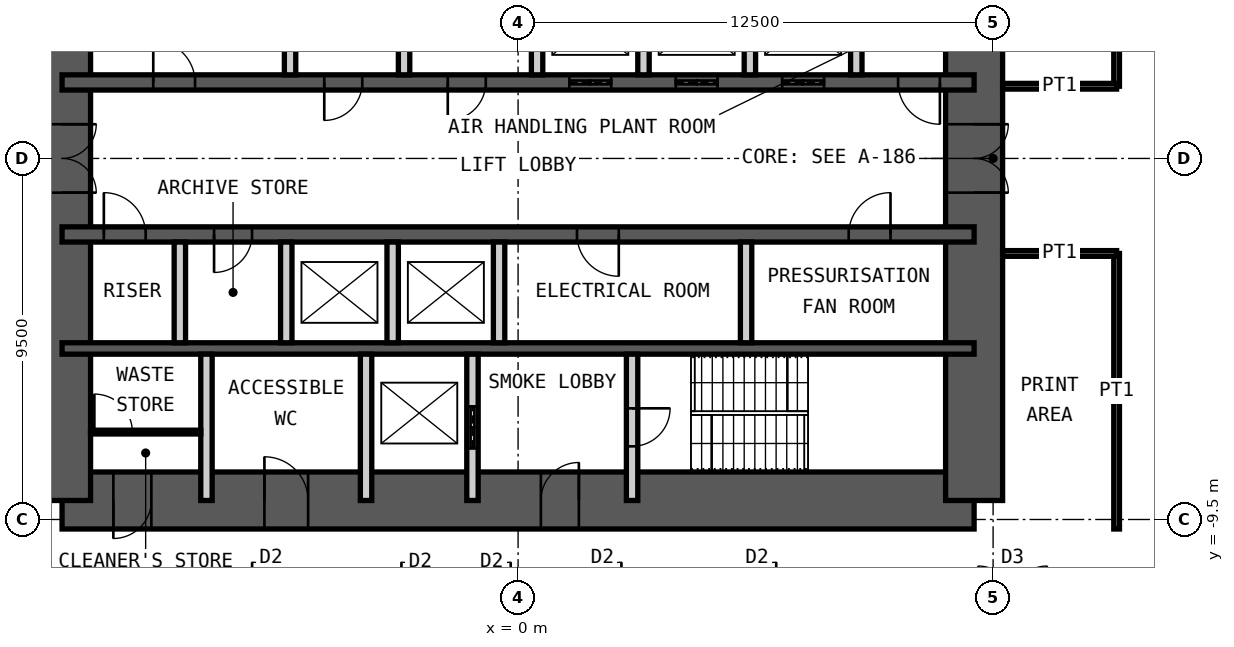
"""IFC4 building model, lengths in metres.
Left out: names, types, materials, properties, quantities, classifications, styles, units other than length and angle.
Written with IfcOpenShell. Run it as: python <this file> out.ifc"""

import sys

from ifc_helpers import new_model, si_unit, direction, frame, frame_2d, origin, place, context, subcontext, project, spatial, rectangle, extrude, element, fill, save


model = new_model("IFC4")
c1 = context("Model", 3, precision=1e-05, world=origin(), true_north=direction((0.0, 1.0)))
c2 = subcontext(c1, "Body", "Model", "MODEL_VIEW")
j1 = project(units=[si_unit("LENGTHUNIT", "METRE"), si_unit("PLANEANGLEUNIT", "RADIAN")], contexts=[c1])
p1 = place(None, origin())
s1 = spatial("IfcSite", under=j1, at=p1, CompositionType="ELEMENT")
p2 = place(p1, origin())
s2 = spatial("IfcBuilding", under=s1, at=p2, CompositionType="ELEMENT")
p3 = place(p2, frame((0.0, 0.0, 111.4)))
s3 = spatial("IfcBuildingStorey", under=s2, at=p3, CompositionType="ELEMENT", Elevation=111.4)
p4 = place(p3, frame((-12.0, -9.0, 0.0), z_axis=(0.0, 0.0, 1.0), x_axis=(1.0, 0.0, 0.0)))
e1 = element("IfcWall", 1, at=p4, inside=s3, PredefinedType="SHEAR", context=c2, shape_type="SweptSolid", body=[
    extrude(rectangle(XDim=24.0, YDim=1.5, at=frame_2d((12.0, 0.0))), origin(), (0.0, 0.0, 1.0), 4.2),
])
p5 = place(p4, frame((1.35, 0.0, 0.0)))
e2 = element("IfcOpeningElement", 2, at=p5, cuts=e1, PredefinedType="OPENING", context=c2, shape_type="SweptSolid", body=[
    extrude(rectangle(XDim=1.0, YDim=2.1, at=frame_2d((0.5, 1.05))), frame((0.0, 0.76, 0.0), z_axis=(0.0, -1.0, 0.0), x_axis=(1.0, 0.0, 0.0)), (0.0, 0.0, 1.0), 1.52),
])
p6 = place(p4, frame((5.325, 0.0, 0.0)))
e3 = element("IfcOpeningElement", 3, at=p6, cuts=e1, PredefinedType="OPENING", context=c2, shape_type="SweptSolid", body=[
    extrude(rectangle(XDim=1.15, YDim=2.1, at=frame_2d((0.575, 1.05))), frame((0.0, 0.76, 0.0), z_axis=(0.0, -1.0, 0.0), x_axis=(1.0, 0.0, 0.0)), (0.0, 0.0, 1.0), 1.52),
])
p7 = place(p4, frame((12.6, 0.0, 0.0)))
e4 = element("IfcOpeningElement", 4, at=p7, cuts=e1, PredefinedType="OPENING", context=c2, shape_type="SweptSolid", body=[
    extrude(rectangle(XDim=1.0, YDim=2.1, at=frame_2d((0.5, 1.05))), frame((0.0, 0.76, 0.0), z_axis=(0.0, -1.0, 0.0), x_axis=(1.0, 0.0, 0.0)), (0.0, 0.0, 1.0), 1.52),
])
p8 = place(p3, frame((12.0, -9.0, 0.0), z_axis=(0.0, 0.0, 1.0), x_axis=(0.0, 1.0, 0.0)))
e5 = element("IfcWall", 5, at=p8, inside=s3, PredefinedType="SHEAR", context=c2, shape_type="SweptSolid", body=[
    extrude(rectangle(XDim=18.0, YDim=1.5, at=frame_2d((9.0, 0.0))), origin(), (0.0, 0.0, 1.0), 4.2),
])
p9 = place(p8, frame((8.1, 0.0, 0.0)))
e6 = element("IfcOpeningElement", 6, at=p9, cuts=e5, PredefinedType="OPENING", context=c2, shape_type="SweptSolid", body=[
    extrude(rectangle(XDim=1.8, YDim=2.1, at=frame_2d((0.9, 1.05))), frame((0.0, 0.76, 0.0), z_axis=(0.0, -1.0, 0.0), x_axis=(1.0, 0.0, 0.0)), (0.0, 0.0, 1.0), 1.52),
])
p10 = place(p3, frame((-12.0, -9.0, 0.0), z_axis=(0.0, 0.0, 1.0), x_axis=(0.0, 1.0, 0.0)))
e7 = element("IfcWall", 7, at=p10, inside=s3, PredefinedType="SHEAR", context=c2, shape_type="SweptSolid", body=[
    extrude(rectangle(XDim=18.0, YDim=1.5, at=frame_2d((9.0, 0.0))), origin(), (0.0, 0.0, 1.0), 4.2),
])
p11 = place(p10, frame((8.1, 0.0, 0.0)))
e8 = element("IfcOpeningElement", 8, at=p11, cuts=e7, PredefinedType="OPENING", context=c2, shape_type="SweptSolid", body=[
    extrude(rectangle(XDim=1.8, YDim=2.1, at=frame_2d((0.9, 1.05))), frame((0.0, 0.76, 0.0), z_axis=(0.0, -1.0, 0.0), x_axis=(1.0, 0.0, 0.0)), (0.0, 0.0, 1.0), 1.52),
])
p12 = place(p3, frame((-12.0, 2.0, 0.0), z_axis=(0.0, 0.0, 1.0), x_axis=(1.0, 0.0, 0.0)))
e9 = element("IfcWall", 9, at=p12, inside=s3, PredefinedType="SHEAR", context=c2, shape_type="SweptSolid", body=[
    extrude(rectangle(XDim=24.0, YDim=0.4, at=frame_2d((12.0, 0.0))), origin(), (0.0, 0.0, 1.0), 4.2),
])
p13 = place(p12, frame((2.4, 0.0, 0.0)))
e10 = element("IfcOpeningElement", 10, at=p13, cuts=e9, PredefinedType="OPENING", context=c2, shape_type="SweptSolid", body=[
    extrude(rectangle(XDim=1.1, YDim=2.1, at=frame_2d((0.55, 1.05))), frame((0.0, 0.21, 0.0), z_axis=(0.0, -1.0, 0.0), x_axis=(1.0, 0.0, 0.0)), (0.0, 0.0, 1.0), 0.42),
])
p14 = place(p12, frame((22.0, 0.0, 0.0)))
e11 = element("IfcOpeningElement", 11, at=p14, cuts=e9, PredefinedType="OPENING", context=c2, shape_type="SweptSolid", body=[
    extrude(rectangle(XDim=1.1, YDim=2.1, at=frame_2d((0.55, 1.05))), frame((0.0, 0.21, 0.0), z_axis=(0.0, -1.0, 0.0), x_axis=(1.0, 0.0, 0.0)), (0.0, 0.0, 1.0), 0.42),
])
p15 = place(p12, frame((10.15, 0.0, 0.0)))
e12 = element("IfcOpeningElement", 12, at=p15, cuts=e9, PredefinedType="OPENING", context=c2, shape_type="SweptSolid", body=[
    extrude(rectangle(XDim=1.0, YDim=2.1, at=frame_2d((0.5, 1.05))), frame((0.0, 0.21, 0.0), z_axis=(0.0, -1.0, 0.0), x_axis=(1.0, 0.0, 0.0)), (0.0, 0.0, 1.0), 0.42),
])
p16 = place(p12, frame((6.9, 0.0, 0.0)))
e13 = element("IfcOpeningElement", 13, at=p16, cuts=e9, PredefinedType="OPENING", context=c2, shape_type="SweptSolid", body=[
    extrude(rectangle(XDim=1.0, YDim=2.1, at=frame_2d((0.5, 1.05))), frame((0.0, 0.21, 0.0), z_axis=(0.0, -1.0, 0.0), x_axis=(1.0, 0.0, 0.0)), (0.0, 0.0, 1.0), 0.42),
])
p17 = place(p12, frame((13.35, 0.0, 0.0)))
e14 = element("IfcOpeningElement", 14, at=p17, cuts=e9, PredefinedType="OPENING", context=c2, shape_type="SweptSolid", body=[
    extrude(rectangle(XDim=1.1, YDim=2.4, at=frame_2d((0.55, 1.2))), frame((0.0, 0.21, 0.0), z_axis=(0.0, -1.0, 0.0), x_axis=(1.0, 0.0, 0.0)), (0.0, 0.0, 1.0), 0.42),
])
p18 = place(p12, frame((16.15, 0.0, 0.0)))
e15 = element("IfcOpeningElement", 15, at=p18, cuts=e9, PredefinedType="OPENING", context=c2, shape_type="SweptSolid", body=[
    extrude(rectangle(XDim=1.1, YDim=2.4, at=frame_2d((0.55, 1.2))), frame((0.0, 0.21, 0.0), z_axis=(0.0, -1.0, 0.0), x_axis=(1.0, 0.0, 0.0)), (0.0, 0.0, 1.0), 0.42),
])
p19 = place(p12, frame((18.95, 0.0, 0.0)))
e16 = element("IfcOpeningElement", 16, at=p19, cuts=e9, PredefinedType="OPENING", context=c2, shape_type="SweptSolid", body=[
    extrude(rectangle(XDim=1.1, YDim=2.4, at=frame_2d((0.55, 1.2))), frame((0.0, 0.21, 0.0), z_axis=(0.0, -1.0, 0.0), x_axis=(1.0, 0.0, 0.0)), (0.0, 0.0, 1.0), 0.42),
])
p20 = place(p3, frame((-12.0, -2.0, 0.0), z_axis=(0.0, 0.0, 1.0), x_axis=(1.0, 0.0, 0.0)))
e17 = element("IfcWall", 17, at=p20, inside=s3, PredefinedType="SHEAR", context=c2, shape_type="SweptSolid", body=[
    extrude(rectangle(XDim=24.0, YDim=0.4, at=frame_2d((12.0, 0.0))), origin(), (0.0, 0.0, 1.0), 4.2),
])
p21 = place(p20, frame((1.1, 0.0, 0.0)))
e18 = element("IfcOpeningElement", 18, at=p21, cuts=e17, PredefinedType="OPENING", context=c2, shape_type="SweptSolid", body=[
    extrude(rectangle(XDim=1.1, YDim=2.1, at=frame_2d((0.55, 1.05))), frame((0.0, 0.21, 0.0), z_axis=(0.0, -1.0, 0.0), x_axis=(1.0, 0.0, 0.0)), (0.0, 0.0, 1.0), 0.42),
])
p22 = place(p20, frame((13.55, 0.0, 0.0)))
e19 = element("IfcOpeningElement", 19, at=p22, cuts=e17, PredefinedType="OPENING", context=c2, shape_type="SweptSolid", body=[
    extrude(rectangle(XDim=1.1, YDim=2.1, at=frame_2d((0.55, 1.05))), frame((0.0, 0.21, 0.0), z_axis=(0.0, -1.0, 0.0), x_axis=(1.0, 0.0, 0.0)), (0.0, 0.0, 1.0), 0.42),
])
p23 = place(p20, frame((20.7, 0.0, 0.0)))
e20 = element("IfcOpeningElement", 20, at=p23, cuts=e17, PredefinedType="OPENING", context=c2, shape_type="SweptSolid", body=[
    extrude(rectangle(XDim=1.1, YDim=2.1, at=frame_2d((0.55, 1.05))), frame((0.0, 0.21, 0.0), z_axis=(0.0, -1.0, 0.0), x_axis=(1.0, 0.0, 0.0)), (0.0, 0.0, 1.0), 0.42),
])
p24 = place(p20, frame((4.0, 0.0, 0.0)))
e21 = element("IfcOpeningElement", 21, at=p24, cuts=e17, PredefinedType="OPENING", context=c2, shape_type="SweptSolid", body=[
    extrude(rectangle(XDim=1.0, YDim=2.1, at=frame_2d((0.5, 1.05))), frame((0.0, 0.21, 0.0), z_axis=(0.0, -1.0, 0.0), x_axis=(1.0, 0.0, 0.0)), (0.0, 0.0, 1.0), 0.42),
])
p25 = place(p3, frame((-12.0, -5.0, 0.0), z_axis=(0.0, 0.0, 1.0), x_axis=(1.0, 0.0, 0.0)))
e22 = element("IfcWall", 22, at=p25, inside=s3, PredefinedType="SHEAR", context=c2, shape_type="SweptSolid", body=[
    extrude(rectangle(XDim=24.0, YDim=0.3, at=frame_2d((12.0, 0.0))), origin(), (0.0, 0.0, 1.0), 4.2),
])
for number, where, z_axis, x_axis in (
    (23, (-6.0, 2.2, 0.0), (0.0, 0.0, 1.0), (0.0, 1.0, 0.0)),
    (24, (-3.0, 2.2, 0.0), (0.0, 0.0, 1.0), (0.0, 1.0, 0.0)),
    (25, (0.5, 2.2, 0.0), (0.0, 0.0, 1.0), (0.0, 1.0, 0.0)),
    (26, (3.3, 2.2, 0.0), (0.0, 0.0, 1.0), (0.0, 1.0, 0.0)),
    (27, (6.1, 2.2, 0.0), (0.0, 0.0, 1.0), (0.0, 1.0, 0.0)),
    (28, (8.9, 2.2, 0.0), (0.0, 0.0, 1.0), (0.0, 1.0, 0.0)),
    (29, (-8.9, -4.85, 0.0), (0.0, 0.0, 1.0), (0.0, 1.0, 0.0)),
    (30, (-6.1, -4.85, 0.0), (0.0, 0.0, 1.0), (0.0, 1.0, 0.0)),
    (31, (-3.3, -4.85, 0.0), (0.0, 0.0, 1.0), (0.0, 1.0, 0.0)),
    (32, (-0.5, -4.85, 0.0), (0.0, 0.0, 1.0), (0.0, 1.0, 0.0)),
    (33, (6.0, -4.85, 0.0), (0.0, 0.0, 1.0), (0.0, 1.0, 0.0)),
):
    element("IfcWall", number, at=place(p3, frame(where, z_axis=z_axis, x_axis=x_axis)), inside=s3, PredefinedType="PARTITIONING", context=c2, shape_type="SweptSolid", body=[
        extrude(rectangle(XDim=2.65, YDim=0.3, at=frame_2d((1.325, 0.0))), origin(), (0.0, 0.0, 1.0), 3.98),
    ])
for number, where, z_axis, x_axis in (
    (34, (-8.2, -9.0, 0.0), (0.0, 0.0, 1.0), (0.0, 1.0, 0.0)),
    (35, (-4.0, -9.0, 0.0), (0.0, 0.0, 1.0), (0.0, 1.0, 0.0)),
):
    element("IfcWall", number, at=place(p3, frame(where, z_axis=z_axis, x_axis=x_axis)), inside=s3, PredefinedType="PARTITIONING", context=c2, shape_type="SweptSolid", body=[
        extrude(rectangle(XDim=3.85, YDim=0.3, at=frame_2d((1.925, 0.0))), origin(), (0.0, 0.0, 1.0), 3.98),
    ])
p26 = place(p3, frame((-1.2, -9.0, 0.0), z_axis=(0.0, 0.0, 1.0), x_axis=(0.0, 1.0, 0.0)))
e36 = element("IfcWall", 36, at=p26, inside=s3, PredefinedType="PARTITIONING", context=c2, shape_type="SweptSolid", body=[
    extrude(rectangle(XDim=3.85, YDim=0.3, at=frame_2d((1.925, 0.0))), origin(), (0.0, 0.0, 1.0), 3.98),
])
p27 = place(p26, frame((1.375, 0.0, 0.0)))
e37 = element("IfcOpeningElement", 37, at=p27, cuts=e36, PredefinedType="OPENING", context=c2, shape_type="SweptSolid", body=[
    extrude(rectangle(XDim=1.1, YDim=2.4, at=frame_2d((0.55, 1.2))), frame((0.0, 0.16, 0.0), z_axis=(0.0, -1.0, 0.0), x_axis=(1.0, 0.0, 0.0)), (0.0, 0.0, 1.0), 0.32),
])
p28 = place(p3, frame((3.0, -9.0, 0.0), z_axis=(0.0, 0.0, 1.0), x_axis=(0.0, 1.0, 0.0)))
e38 = element("IfcWall", 38, at=p28, inside=s3, PredefinedType="PARTITIONING", context=c2, shape_type="SweptSolid", body=[
    extrude(rectangle(XDim=3.85, YDim=0.3, at=frame_2d((1.925, 0.0))), origin(), (0.0, 0.0, 1.0), 3.98),
])
p29 = place(p28, frame((1.425, 0.0, 0.0)))
e39 = element("IfcOpeningElement", 39, at=p29, cuts=e38, PredefinedType="OPENING", context=c2, shape_type="SweptSolid", body=[
    extrude(rectangle(XDim=1.0, YDim=2.1, at=frame_2d((0.5, 1.05))), frame((0.0, 0.16, 0.0), z_axis=(0.0, -1.0, 0.0), x_axis=(1.0, 0.0, 0.0)), (0.0, 0.0, 1.0), 0.32),
])
p30 = place(p3, frame((-11.25, -7.2, 0.0), z_axis=(0.0, 0.0, 1.0), x_axis=(1.0, 0.0, 0.0)))
e40 = element("IfcWall", 40, at=p30, inside=s3, PredefinedType="PARTITIONING", context=c2, shape_type="SweptSolid", body=[
    extrude(rectangle(XDim=2.9, YDim=0.1, at=frame_2d((1.45, 0.0))), origin(), (0.0, 0.0, 1.0), 3.98),
])
p31 = place(p30, frame((0.1, 0.0, 0.0)))
e41 = element("IfcOpeningElement", 41, at=p31, cuts=e40, PredefinedType="OPENING", context=c2, shape_type="SweptSolid", body=[
    extrude(rectangle(XDim=1.0, YDim=2.4, at=frame_2d((0.5, 1.2))), frame((0.0, 0.06, 0.0), z_axis=(0.0, -1.0, 0.0), x_axis=(1.0, 0.0, 0.0)), (0.0, 0.0, 1.0), 0.12),
])
p32 = place(p3, frame((15.75, 1.9, 0.0), z_axis=(0.0, 0.0, 1.0), x_axis=(0.0, 1.0, 0.0)))
e42 = element("IfcWall", 42, at=p32, inside=s3, PredefinedType="PARTITIONING", context=c2, shape_type="SweptSolid", body=[
    extrude(rectangle(XDim=7.85, YDim=0.15, at=frame_2d((3.925, 0.0))), origin(), (0.0, 0.0, 1.0), 4.03),
])
p33 = place(p3, frame((12.75, 1.9, 0.0), z_axis=(0.0, 0.0, 1.0), x_axis=(1.0, 0.0, 0.0)))
e43 = element("IfcWall", 43, at=p33, inside=s3, PredefinedType="PARTITIONING", context=c2, shape_type="SweptSolid", body=[
    extrude(rectangle(XDim=3.0, YDim=0.15, at=frame_2d((1.5, 0.0))), origin(), (0.0, 0.0, 1.0), 2.93),
])
p34 = place(p3, frame((15.75, -9.75, 0.0), z_axis=(0.0, 0.0, 1.0), x_axis=(0.0, 1.0, 0.0)))
e44 = element("IfcWall", 44, at=p34, inside=s3, PredefinedType="PARTITIONING", context=c2, shape_type="SweptSolid", body=[
    extrude(rectangle(XDim=7.25, YDim=0.15, at=frame_2d((3.625, 0.0))), origin(), (0.0, 0.0, 1.0), 4.03),
])
p35 = place(p3, frame((12.75, -2.5, 0.0), z_axis=(0.0, 0.0, 1.0), x_axis=(1.0, 0.0, 0.0)))
e45 = element("IfcWall", 45, at=p35, inside=s3, PredefinedType="PARTITIONING", context=c2, shape_type="SweptSolid", body=[
    extrude(rectangle(XDim=3.0, YDim=0.15, at=frame_2d((1.5, 0.0))), origin(), (0.0, 0.0, 1.0), 3.33),
])
p36 = place(p5, origin())
e46 = element("IfcDoor", 46, at=p36, inside=s3, OperationType="SINGLE_SWING_LEFT", PredefinedType="DOOR", context=c2, shape_type="SweptSolid", body=[
    extrude(rectangle(XDim=1.0, YDim=2.1, at=frame_2d((0.5, 1.05))), frame((0.0, 0.025, 0.0), z_axis=(0.0, -1.0, 0.0), x_axis=(1.0, 0.0, 0.0)), (0.0, 0.0, 1.0), 0.05),
])
fill(e2, e46)
p37 = place(p6, origin())
e47 = element("IfcDoor", 47, at=p37, inside=s3, OperationType="SINGLE_SWING_RIGHT", PredefinedType="DOOR", context=c2, shape_type="SweptSolid", body=[
    extrude(rectangle(XDim=1.15, YDim=2.1, at=frame_2d((0.575, 1.05))), frame((0.0, 0.025, 0.0), z_axis=(0.0, -1.0, 0.0), x_axis=(1.0, 0.0, 0.0)), (0.0, 0.0, 1.0), 0.05),
])
fill(e3, e47)
p38 = place(p7, origin())
e48 = element("IfcDoor", 48, at=p38, inside=s3, OperationType="SINGLE_SWING_LEFT", PredefinedType="DOOR", context=c2, shape_type="SweptSolid", body=[
    extrude(rectangle(XDim=1.0, YDim=2.1, at=frame_2d((0.5, 1.05))), frame((0.0, 0.025, 0.0), z_axis=(0.0, -1.0, 0.0), x_axis=(1.0, 0.0, 0.0)), (0.0, 0.0, 1.0), 0.05),
])
fill(e4, e48)
p39 = place(p29, origin())
e49 = element("IfcDoor", 49, at=p39, inside=s3, OperationType="SINGLE_SWING_RIGHT", PredefinedType="DOOR", context=c2, shape_type="SweptSolid", body=[
    extrude(rectangle(XDim=1.0, YDim=2.1, at=frame_2d((0.5, 1.05))), frame((0.0, 0.025, 0.0), z_axis=(0.0, -1.0, 0.0), x_axis=(1.0, 0.0, 0.0)), (0.0, 0.0, 1.0), 0.05),
])
fill(e39, e49)
p40 = place(p13, origin())
e50 = element("IfcDoor", 50, at=p40, inside=s3, OperationType="SINGLE_SWING_RIGHT", PredefinedType="DOOR", context=c2, shape_type="SweptSolid", body=[
    extrude(rectangle(XDim=1.1, YDim=2.1, at=frame_2d((0.55, 1.05))), frame((0.0, 0.025, 0.0), z_axis=(0.0, -1.0, 0.0), x_axis=(1.0, 0.0, 0.0)), (0.0, 0.0, 1.0), 0.05),
])
fill(e10, e50)
p41 = place(p21, origin())
e51 = element("IfcDoor", 51, at=p41, inside=s3, OperationType="SINGLE_SWING_RIGHT", PredefinedType="DOOR", context=c2, shape_type="SweptSolid", body=[
    extrude(rectangle(XDim=1.1, YDim=2.1, at=frame_2d((0.55, 1.05))), frame((0.0, 0.025, 0.0), z_axis=(0.0, -1.0, 0.0), x_axis=(1.0, 0.0, 0.0)), (0.0, 0.0, 1.0), 0.05),
])
fill(e18, e51)
p42 = place(p14, origin())
e52 = element("IfcDoor", 52, at=p42, inside=s3, OperationType="SINGLE_SWING_RIGHT", PredefinedType="DOOR", context=c2, shape_type="SweptSolid", body=[
    extrude(rectangle(XDim=1.1, YDim=2.1, at=frame_2d((0.55, 1.05))), frame((0.0, 0.025, 0.0), z_axis=(0.0, -1.0, 0.0), x_axis=(1.0, 0.0, 0.0)), (0.0, 0.0, 1.0), 0.05),
])
fill(e11, e52)
p43 = place(p15, origin())
e53 = element("IfcDoor", 53, at=p43, inside=s3, OperationType="SINGLE_SWING_LEFT", PredefinedType="DOOR", context=c2, shape_type="SweptSolid", body=[
    extrude(rectangle(XDim=1.0, YDim=2.1, at=frame_2d((0.5, 1.05))), frame((0.0, 0.025, 0.0), z_axis=(0.0, -1.0, 0.0), x_axis=(1.0, 0.0, 0.0)), (0.0, 0.0, 1.0), 0.05),
])
fill(e12, e53)
p44 = place(p22, origin())
e54 = element("IfcDoor", 54, at=p44, inside=s3, OperationType="SINGLE_SWING_RIGHT", PredefinedType="DOOR", context=c2, shape_type="SweptSolid", body=[
    extrude(rectangle(XDim=1.1, YDim=2.1, at=frame_2d((0.55, 1.05))), frame((0.0, 0.025, 0.0), z_axis=(0.0, -1.0, 0.0), x_axis=(1.0, 0.0, 0.0)), (0.0, 0.0, 1.0), 0.05),
])
fill(e19, e54)
p45 = place(p23, origin())
e55 = element("IfcDoor", 55, at=p45, inside=s3, OperationType="SINGLE_SWING_LEFT", PredefinedType="DOOR", context=c2, shape_type="SweptSolid", body=[
    extrude(rectangle(XDim=1.1, YDim=2.1, at=frame_2d((0.55, 1.05))), frame((0.0, 0.025, 0.0), z_axis=(0.0, -1.0, 0.0), x_axis=(1.0, 0.0, 0.0)), (0.0, 0.0, 1.0), 0.05),
])
fill(e20, e55)
p46 = place(p9, origin())
e56 = element("IfcDoor", 56, at=p46, inside=s3, OperationType="DOUBLE_DOOR_DOUBLE_SWING", PredefinedType="DOOR", context=c2, shape_type="SweptSolid", body=[
    extrude(rectangle(XDim=1.8, YDim=2.1, at=frame_2d((0.9, 1.05))), frame((0.0, 0.025, 0.0), z_axis=(0.0, -1.0, 0.0), x_axis=(1.0, 0.0, 0.0)), (0.0, 0.0, 1.0), 0.05),
])
fill(e6, e56)
p47 = place(p11, origin())
e57 = element("IfcDoor", 57, at=p47, inside=s3, OperationType="DOUBLE_DOOR_DOUBLE_SWING", PredefinedType="DOOR", context=c2, shape_type="SweptSolid", body=[
    extrude(rectangle(XDim=1.8, YDim=2.1, at=frame_2d((0.9, 1.05))), frame((0.0, 0.025, 0.0), z_axis=(0.0, -1.0, 0.0), x_axis=(1.0, 0.0, 0.0)), (0.0, 0.0, 1.0), 0.05),
])
fill(e8, e57)
p48 = place(p27, origin())
e58 = element("IfcDoor", 58, at=p48, inside=s3, OperationType="DOUBLE_DOOR_SLIDING", PredefinedType="DOOR", context=c2, shape_type="SweptSolid", body=[
    extrude(rectangle(XDim=1.1, YDim=2.4, at=frame_2d((0.55, 1.2))), frame((0.0, 0.025, 0.0), z_axis=(0.0, -1.0, 0.0), x_axis=(1.0, 0.0, 0.0)), (0.0, 0.0, 1.0), 0.05),
])
fill(e37, e58)
p49 = place(p16, origin())
e59 = element("IfcDoor", 59, at=p49, inside=s3, OperationType="SINGLE_SWING_LEFT", PredefinedType="DOOR", context=c2, shape_type="SweptSolid", body=[
    extrude(rectangle(XDim=1.0, YDim=2.1, at=frame_2d((0.5, 1.05))), frame((0.0, 0.025, 0.0), z_axis=(0.0, -1.0, 0.0), x_axis=(1.0, 0.0, 0.0)), (0.0, 0.0, 1.0), 0.05),
])
fill(e13, e59)
p50 = place(p17, origin())
e60 = element("IfcDoor", 60, at=p50, inside=s3, OperationType="DOUBLE_DOOR_SLIDING", PredefinedType="DOOR", context=c2, shape_type="SweptSolid", body=[
    extrude(rectangle(XDim=1.1, YDim=2.4, at=frame_2d((0.55, 1.2))), frame((0.0, 0.025, 0.0), z_axis=(0.0, -1.0, 0.0), x_axis=(1.0, 0.0, 0.0)), (0.0, 0.0, 1.0), 0.05),
])
fill(e14, e60)
p51 = place(p18, origin())
e61 = element("IfcDoor", 61, at=p51, inside=s3, OperationType="DOUBLE_DOOR_SLIDING", PredefinedType="DOOR", context=c2, shape_type="SweptSolid", body=[
    extrude(rectangle(XDim=1.1, YDim=2.4, at=frame_2d((0.55, 1.2))), frame((0.0, 0.025, 0.0), z_axis=(0.0, -1.0, 0.0), x_axis=(1.0, 0.0, 0.0)), (0.0, 0.0, 1.0), 0.05),
])
fill(e15, e61)
p52 = place(p19, origin())
e62 = element("IfcDoor", 62, at=p52, inside=s3, OperationType="DOUBLE_DOOR_SLIDING", PredefinedType="DOOR", context=c2, shape_type="SweptSolid", body=[
    extrude(rectangle(XDim=1.1, YDim=2.4, at=frame_2d((0.55, 1.2))), frame((0.0, 0.025, 0.0), z_axis=(0.0, -1.0, 0.0), x_axis=(1.0, 0.0, 0.0)), (0.0, 0.0, 1.0), 0.05),
])
fill(e16, e62)
p53 = place(p24, origin())
e63 = element("IfcDoor", 63, at=p53, inside=s3, OperationType="SINGLE_SWING_LEFT", PredefinedType="DOOR", context=c2, shape_type="SweptSolid", body=[
    extrude(rectangle(XDim=1.0, YDim=2.1, at=frame_2d((0.5, 1.05))), frame((0.0, 0.025, 0.0), z_axis=(0.0, -1.0, 0.0), x_axis=(1.0, 0.0, 0.0)), (0.0, 0.0, 1.0), 0.05),
])
fill(e21, e63)
p54 = place(p31, origin())
e64 = element("IfcDoor", 64, at=p54, inside=s3, OperationType="SINGLE_SWING_RIGHT", PredefinedType="DOOR", context=c2, shape_type="SweptSolid", body=[
    extrude(rectangle(XDim=1.0, YDim=2.4, at=frame_2d((0.5, 1.2))), frame((0.0, 0.025, 0.0), z_axis=(0.0, -1.0, 0.0), x_axis=(1.0, 0.0, 0.0)), (0.0, 0.0, 1.0), 0.05),
])
fill(e41, e64)
save(model, sys.argv[1])
